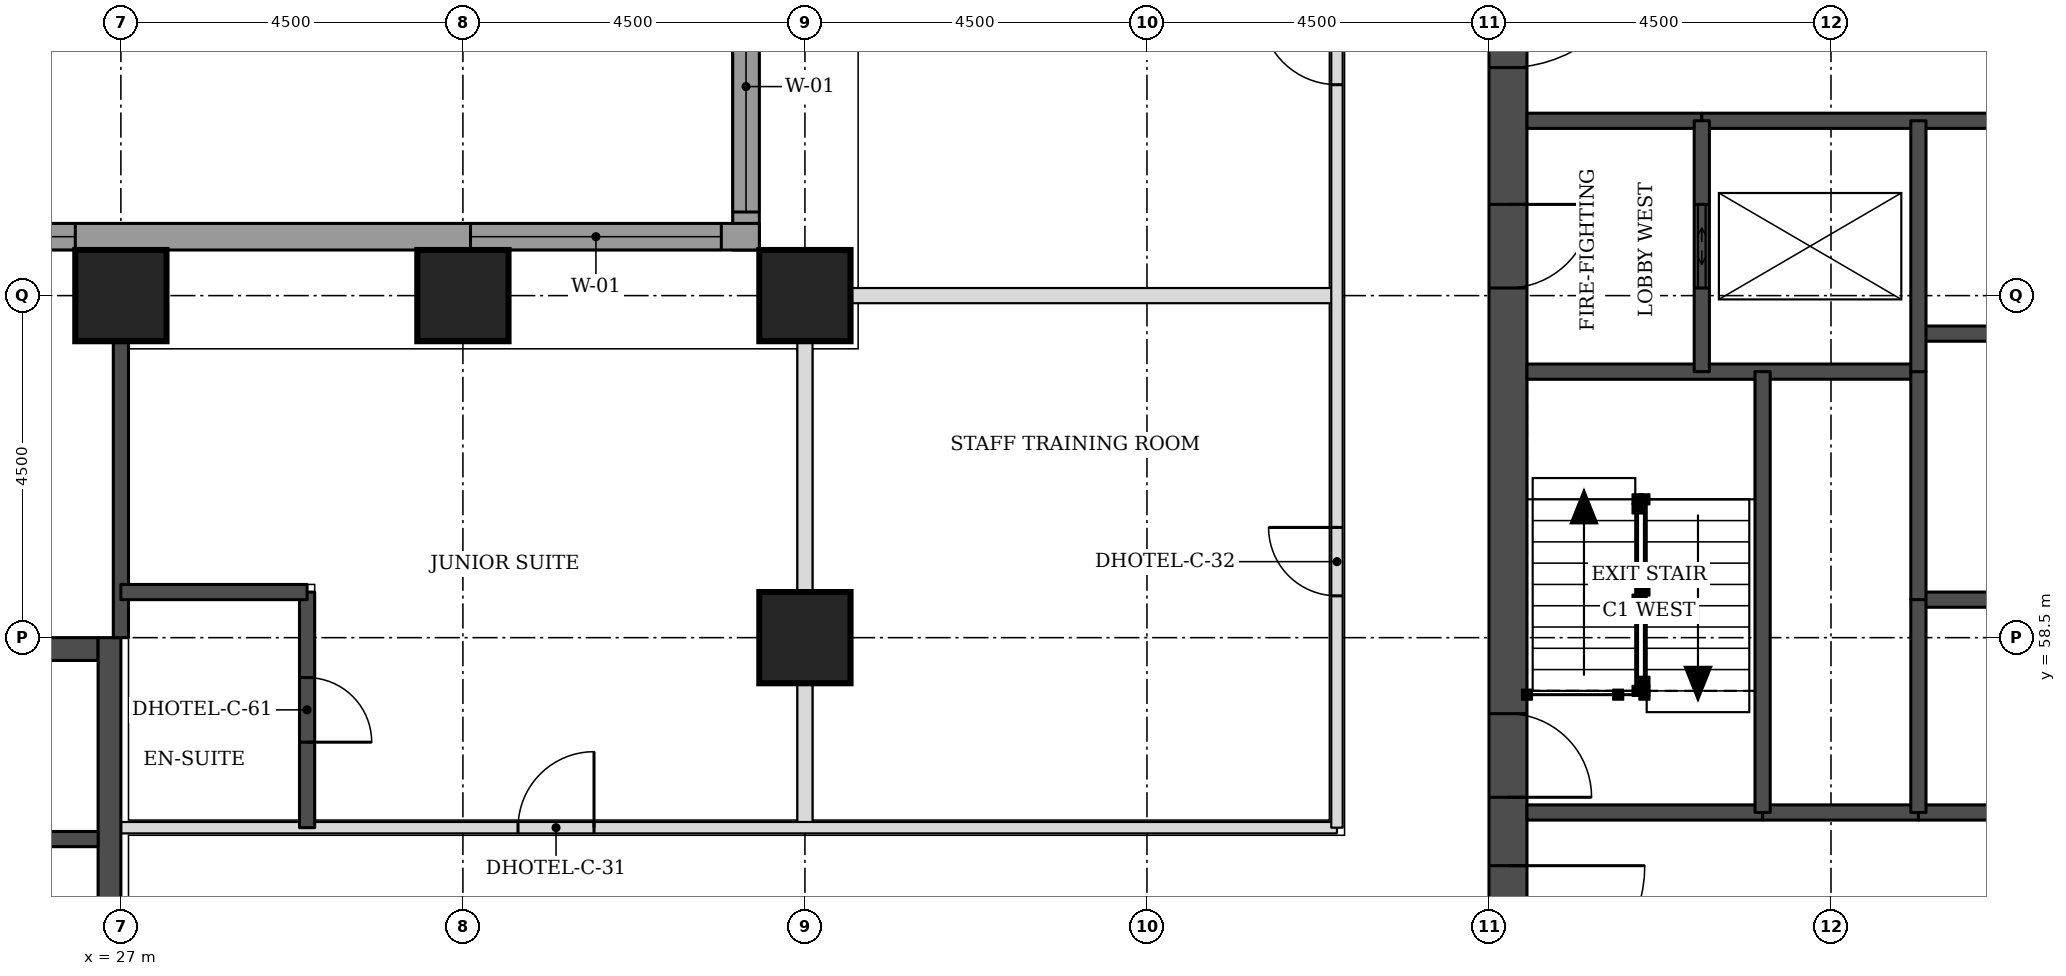
"""IFC4 building model, lengths in metres.
Left out: names, types, materials, properties, quantities, classifications, styles, units other than length and angle.
Written with IfcOpenShell. Run it as: python <this file> out.ifc"""

import sys

from ifc_helpers import new_model, si_unit, direction, frame, frame_2d, origin, origin_2d, place, context, subcontext, project, spatial, rectangle, extrude, element, fill, save


model = new_model("IFC4")
c1 = context("Model", 3, precision=1e-05, world=origin(), true_north=direction((0.0, 1.0)))
c2 = subcontext(c1, "Body", "Model", "MODEL_VIEW")
j1 = project(units=[si_unit("LENGTHUNIT", "METRE"), si_unit("PLANEANGLEUNIT", "RADIAN")], contexts=[c1])
p1 = place(None, origin())
s1 = spatial("IfcSite", under=j1, at=p1, CompositionType="ELEMENT")
p2 = place(p1, origin())
s2 = spatial("IfcBuilding", under=s1, at=p2, CompositionType="ELEMENT")
p3 = place(p2, frame((0.0, 0.0, 56.1)))
s3 = spatial("IfcBuildingStorey", under=s2, at=p3, CompositionType="ELEMENT", Elevation=56.1)
for number, where, z_axis, x_axis in (
    (1, (36.0, 58.5, 0.0), (0.0, 0.0, 1.0), (1.0, 0.0, 0.0)),
    (2, (27.0, 63.0, 0.0), (0.0, 0.0, 1.0), (1.0, 0.0, 0.0)),
    (3, (31.5, 63.0, 0.0), (0.0, 0.0, 1.0), (1.0, 0.0, 0.0)),
    (4, (36.0, 63.0, 0.0), (0.0, 0.0, 1.0), (1.0, 0.0, 0.0)),
):
    element("IfcColumn", number, at=place(p3, frame(where, z_axis=z_axis, x_axis=x_axis)), inside=s3, PredefinedType="COLUMN", context=c2, shape_type="SweptSolid", body=[
        extrude(rectangle(XDim=1.2, YDim=1.2, at=origin_2d()), origin(), (0.0, 0.0, 1.0), 3.3),
    ])
p4 = place(p3, frame((45.25, 49.5, 0.0), z_axis=(0.0, 0.0, 1.0), x_axis=(0.0, 1.0, 0.0)))
e5 = element("IfcWall", 5, at=p4, inside=s3, PredefinedType="SHEAR", context=c2, shape_type="SweptSolid", body=[
    extrude(rectangle(XDim=22.5, YDim=0.5, at=frame_2d((11.25, 0.0))), origin(), (0.0, 0.0, 1.0), 3.3),
])
p5 = place(p4, frame((4.2, 0.0, 0.0)))
e6 = element("IfcOpeningElement", 6, at=p5, cuts=e5, PredefinedType="OPENING", context=c2, shape_type="SweptSolid", body=[
    extrude(rectangle(XDim=1.8, YDim=2.1, at=frame_2d((0.9, 1.05))), frame((0.0, 0.26, 0.0), z_axis=(0.0, -1.0, 0.0), x_axis=(1.0, 0.0, 0.0)), (0.0, 0.0, 1.0), 0.52),
])
p6 = place(p4, frame((6.9, 0.0, 0.0)))
e7 = element("IfcOpeningElement", 7, at=p6, cuts=e5, PredefinedType="OPENING", context=c2, shape_type="SweptSolid", body=[
    extrude(rectangle(XDim=1.1, YDim=2.1, at=frame_2d((0.55, 1.05))), frame((0.0, 0.26, 0.0), z_axis=(0.0, -1.0, 0.0), x_axis=(1.0, 0.0, 0.0)), (0.0, 0.0, 1.0), 0.52),
])
p7 = place(p4, frame((13.6, 0.0, 0.0)))
e8 = element("IfcOpeningElement", 8, at=p7, cuts=e5, PredefinedType="OPENING", context=c2, shape_type="SweptSolid", body=[
    extrude(rectangle(XDim=1.1, YDim=2.1, at=frame_2d((0.55, 1.05))), frame((0.0, 0.26, 0.0), z_axis=(0.0, -1.0, 0.0), x_axis=(1.0, 0.0, 0.0)), (0.0, 0.0, 1.0), 0.52),
])
p8 = place(p4, frame((16.5, 0.0, 0.0)))
e9 = element("IfcOpeningElement", 9, at=p8, cuts=e5, PredefinedType="OPENING", context=c2, shape_type="SweptSolid", body=[
    extrude(rectangle(XDim=1.8, YDim=2.1, at=frame_2d((0.9, 1.05))), frame((0.0, 0.26, 0.0), z_axis=(0.0, -1.0, 0.0), x_axis=(1.0, 0.0, 0.0)), (0.0, 0.0, 1.0), 0.52),
])
p9 = place(p3, frame((18.3, 58.35, 0.0), z_axis=(0.0, 0.0, 1.0), x_axis=(1.0, 0.0, 0.0)))
e10 = element("IfcWall", 10, at=p9, inside=s3, PredefinedType="SHEAR", context=c2, shape_type="SweptSolid", body=[
    extrude(rectangle(XDim=8.4, YDim=0.3, at=frame_2d((4.2, 0.0))), origin(), (0.0, 0.0, 1.0), 3.3),
])
p10 = place(p9, frame((3.3, 0.0, 0.0)))
e11 = element("IfcOpeningElement", 11, at=p10, cuts=e10, PredefinedType="OPENING", context=c2, shape_type="SweptSolid", body=[
    extrude(rectangle(XDim=1.8, YDim=2.1, at=frame_2d((0.9, 1.05))), frame((0.0, 0.16, 0.0), z_axis=(0.0, -1.0, 0.0), x_axis=(1.0, 0.0, 0.0)), (0.0, 0.0, 1.0), 0.32),
])
p11 = place(p3, frame((26.85, 49.5, 0.0), z_axis=(0.0, 0.0, 1.0), x_axis=(0.0, 1.0, 0.0)))
e12 = element("IfcWall", 12, at=p11, inside=s3, PredefinedType="SHEAR", context=c2, shape_type="SweptSolid", body=[
    extrude(rectangle(XDim=9.0, YDim=0.3, at=frame_2d((4.5, 0.0))), origin(), (0.0, 0.0, 1.0), 3.3),
])
p12 = place(p3, frame((35.225, 76.894, 0.0), z_axis=(0.0, 0.0, 1.0), x_axis=(0.0, -1.0, 0.0)))
e13 = element("IfcWall", 13, at=p12, inside=s3, PredefinedType="STANDARD", context=c2, shape_type="SweptSolid", body=[
    extrude(rectangle(XDim=13.293, YDim=0.35, at=frame_2d((6.647, 0.0))), origin(), (0.0, 0.0, 1.0), 3.055),
])
p13 = place(p12, frame((9.493, 0.0, 0.8)))
e14 = element("IfcOpeningElement", 14, at=p13, cuts=e13, PredefinedType="OPENING", context=c2, shape_type="SweptSolid", body=[
    extrude(rectangle(XDim=3.3, YDim=1.5, at=frame_2d((1.65, 0.75))), frame((0.0, 0.185, 0.0), z_axis=(0.0, -1.0, 0.0), x_axis=(1.0, 0.0, 0.0)), (0.0, 0.0, 1.0), 0.37),
])
p14 = place(p3, frame((35.4, 63.775, 0.0), z_axis=(0.0, 0.0, 1.0), x_axis=(-1.0, 0.0, 0.0)))
e15 = element("IfcWall", 15, at=p14, inside=s3, PredefinedType="STANDARD", context=c2, shape_type="SweptSolid", body=[
    extrude(rectangle(XDim=17.793, YDim=0.35, at=frame_2d((8.897, 0.0))), origin(), (0.0, 0.0, 1.0), 3.055),
])
p15 = place(p14, frame((0.5, 0.0, 0.8)))
e16 = element("IfcOpeningElement", 16, at=p15, cuts=e15, PredefinedType="OPENING", context=c2, shape_type="SweptSolid", body=[
    extrude(rectangle(XDim=3.3, YDim=1.5, at=frame_2d((1.65, 0.75))), frame((0.0, 0.185, 0.0), z_axis=(0.0, -1.0, 0.0), x_axis=(1.0, 0.0, 0.0)), (0.0, 0.0, 1.0), 0.37),
])
p16 = place(p14, frame((9.0, 0.0, 0.8)))
e17 = element("IfcOpeningElement", 17, at=p16, cuts=e15, PredefinedType="OPENING", context=c2, shape_type="SweptSolid", body=[
    extrude(rectangle(XDim=3.3, YDim=1.5, at=frame_2d((1.65, 0.75))), frame((0.0, 0.185, 0.0), z_axis=(0.0, -1.0, 0.0), x_axis=(1.0, 0.0, 0.0)), (0.0, 0.0, 1.0), 0.37),
])
p17 = place(p3, frame((36.0, 56.0, 0.0), z_axis=(0.0, 0.0, 1.0), x_axis=(0.0, 1.0, 0.0)))
e18 = element("IfcWall", 18, at=p17, inside=s3, PredefinedType="PARTITIONING", context=c2, shape_type="SweptSolid", body=[
    extrude(rectangle(XDim=6.4, YDim=0.2, at=frame_2d((3.2, 0.0))), origin(), (0.0, 0.0, 1.0), 2.33),
])
p18 = place(p3, frame((36.6, 63.0, 0.0), z_axis=(0.0, 0.0, 1.0), x_axis=(1.0, 0.0, 0.0)))
e19 = element("IfcWall", 19, at=p18, inside=s3, PredefinedType="PARTITIONING", context=c2, shape_type="SweptSolid", body=[
    extrude(rectangle(XDim=6.4, YDim=0.2, at=frame_2d((3.2, 0.0))), origin(), (0.0, 0.0, 1.0), 3.08),
])
p19 = place(p3, frame((27.0, 56.0, 0.0), z_axis=(0.0, 0.0, 1.0), x_axis=(1.0, 0.0, 0.0)))
e20 = element("IfcWall", 20, at=p19, inside=s3, PredefinedType="PARTITIONING", context=c2, shape_type="SweptSolid", body=[
    extrude(rectangle(XDim=16.0, YDim=0.15, at=frame_2d((8.0, 0.0))), origin(), (0.0, 0.0, 1.0), 3.08),
])
p20 = place(p19, frame((5.225, 0.0, 0.0)))
e21 = element("IfcOpeningElement", 21, at=p20, cuts=e20, PredefinedType="OPENING", context=c2, shape_type="SweptSolid", body=[
    extrude(rectangle(XDim=1.0, YDim=2.1, at=frame_2d((0.5, 1.05))), frame((0.0, 0.085, 0.0), z_axis=(0.0, -1.0, 0.0), x_axis=(1.0, 0.0, 0.0)), (0.0, 0.0, 1.0), 0.17),
])
p21 = place(p3, frame((43.0, 56.0, 0.0), z_axis=(0.0, 0.0, 1.0), x_axis=(0.0, 1.0, 0.0)))
e22 = element("IfcWall", 22, at=p21, inside=s3, PredefinedType="PARTITIONING", context=c2, shape_type="SweptSolid", body=[
    extrude(rectangle(XDim=18.0, YDim=0.15, at=frame_2d((9.0, 0.0))), origin(), (0.0, 0.0, 1.0), 3.08),
])
p22 = place(p21, frame((9.775, 0.0, 0.0)))
e23 = element("IfcOpeningElement", 23, at=p22, cuts=e22, PredefinedType="OPENING", context=c2, shape_type="SweptSolid", body=[
    extrude(rectangle(XDim=1.0, YDim=2.1, at=frame_2d((0.5, 1.05))), frame((0.0, 0.085, 0.0), z_axis=(0.0, -1.0, 0.0), x_axis=(1.0, 0.0, 0.0)), (0.0, 0.0, 1.0), 0.17),
])
p23 = place(p21, frame((16.553, 0.0, 0.0)))
e24 = element("IfcOpeningElement", 24, at=p23, cuts=e22, PredefinedType="OPENING", context=c2, shape_type="SweptSolid", body=[
    extrude(rectangle(XDim=1.0, YDim=2.1, at=frame_2d((0.5, 1.05))), frame((0.0, 0.085, 0.0), z_axis=(0.0, -1.0, 0.0), x_axis=(1.0, 0.0, 0.0)), (0.0, 0.0, 1.0), 0.17),
])
p24 = place(p21, frame((3.05, 0.0, 0.0)))
e25 = element("IfcOpeningElement", 25, at=p24, cuts=e22, PredefinedType="OPENING", context=c2, shape_type="SweptSolid", body=[
    extrude(rectangle(XDim=0.9, YDim=2.1, at=frame_2d((0.45, 1.05))), frame((0.0, 0.085, 0.0), z_axis=(0.0, -1.0, 0.0), x_axis=(1.0, 0.0, 0.0)), (0.0, 0.0, 1.0), 0.17),
])
p25 = place(p3, frame((27.0, 58.5, 0.0), z_axis=(0.0, 0.0, 1.0), x_axis=(0.0, 1.0, 0.0)))
e26 = element("IfcWall", 26, at=p25, inside=s3, PredefinedType="SOLIDWALL", context=c2, shape_type="SweptSolid", body=[
    extrude(rectangle(XDim=3.9, YDim=0.2, at=frame_2d((1.95, 0.0))), origin(), (0.0, 0.0, 1.0), 3.08),
])
p26 = place(p3, frame((29.45, 56.0, 0.0), z_axis=(0.0, 0.0, 1.0), x_axis=(0.0, 1.0, 0.0)))
e27 = element("IfcWall", 27, at=p26, inside=s3, PredefinedType="SOLIDWALL", context=c2, shape_type="SweptSolid", body=[
    extrude(rectangle(XDim=3.1, YDim=0.2, at=frame_2d((1.55, 0.0))), origin(), (0.0, 0.0, 1.0), 3.08),
])
p27 = place(p26, frame((1.125, 0.0, 0.0)))
e28 = element("IfcOpeningElement", 28, at=p27, cuts=e27, PredefinedType="OPENING", context=c2, shape_type="SweptSolid", body=[
    extrude(rectangle(XDim=0.85, YDim=2.1, at=frame_2d((0.425, 1.05))), frame((0.0, 0.11, 0.0), z_axis=(0.0, -1.0, 0.0), x_axis=(1.0, 0.0, 0.0)), (0.0, 0.0, 1.0), 0.22),
])
p28 = place(p3, frame((27.0, 59.1, 0.0), z_axis=(0.0, 0.0, 1.0), x_axis=(1.0, 0.0, 0.0)))
e29 = element("IfcWall", 29, at=p28, inside=s3, PredefinedType="SOLIDWALL", context=c2, shape_type="SweptSolid", body=[
    extrude(rectangle(XDim=2.45, YDim=0.2, at=frame_2d((1.225, 0.0))), origin(), (0.0, 0.0, 1.0), 3.08),
])
p29 = place(p3, frame((48.6, 56.2, 0.0), z_axis=(0.0, 0.0, 1.0), x_axis=(1.0, 0.0, 0.0)))
e30 = element("IfcWall", 30, at=p29, inside=s3, PredefinedType="SOLIDWALL", context=c2, shape_type="SweptSolid", body=[
    extrude(rectangle(XDim=2.05, YDim=0.2, at=frame_2d((1.025, 0.0))), origin(), (0.0, 0.0, 1.0), 3.08),
])
p30 = place(p3, frame((45.5, 56.2, 0.0), z_axis=(0.0, 0.0, 1.0), x_axis=(1.0, 0.0, 0.0)))
e31 = element("IfcWall", 31, at=p30, inside=s3, PredefinedType="SOLIDWALL", context=c2, shape_type="SweptSolid", body=[
    extrude(rectangle(XDim=3.1, YDim=0.2, at=frame_2d((1.55, 0.0))), origin(), (0.0, 0.0, 1.0), 3.08),
])
p31 = place(p3, frame((50.65, 56.2, 0.0), z_axis=(0.0, 0.0, 1.0), x_axis=(1.0, 0.0, 0.0)))
e32 = element("IfcWall", 32, at=p31, inside=s3, PredefinedType="SOLIDWALL", context=c2, shape_type="SweptSolid", body=[
    extrude(rectangle(XDim=11.2, YDim=0.2, at=frame_2d((5.6, 0.0))), origin(), (0.0, 0.0, 1.0), 3.08),
])
p32 = place(p3, frame((50.65, 59.0, 0.0), z_axis=(0.0, 0.0, 1.0), x_axis=(1.0, 0.0, 0.0)))
e33 = element("IfcWall", 33, at=p32, inside=s3, PredefinedType="SOLIDWALL", context=c2, shape_type="SweptSolid", body=[
    extrude(rectangle(XDim=11.2, YDim=0.2, at=frame_2d((5.6, 0.0))), origin(), (0.0, 0.0, 1.0), 3.3),
])
p33 = place(p3, frame((45.5, 62.0, 0.0), z_axis=(0.0, 0.0, 1.0), x_axis=(1.0, 0.0, 0.0)))
e34 = element("IfcWall", 34, at=p33, inside=s3, PredefinedType="SOLIDWALL", context=c2, shape_type="SweptSolid", body=[
    extrude(rectangle(XDim=5.15, YDim=0.2, at=frame_2d((2.575, 0.0))), origin(), (0.0, 0.0, 1.0), 3.08),
])
p34 = place(p3, frame((50.65, 62.5, 0.0), z_axis=(0.0, 0.0, 1.0), x_axis=(1.0, 0.0, 0.0)))
e35 = element("IfcWall", 35, at=p34, inside=s3, PredefinedType="SOLIDWALL", context=c2, shape_type="SweptSolid", body=[
    extrude(rectangle(XDim=11.2, YDim=0.2, at=frame_2d((5.6, 0.0))), origin(), (0.0, 0.0, 1.0), 3.3),
])
p35 = place(p3, frame((45.5, 65.3, 0.0), z_axis=(0.0, 0.0, 1.0), x_axis=(1.0, 0.0, 0.0)))
e36 = element("IfcWall", 36, at=p35, inside=s3, PredefinedType="SOLIDWALL", context=c2, shape_type="SweptSolid", body=[
    extrude(rectangle(XDim=2.3, YDim=0.2, at=frame_2d((1.15, 0.0))), origin(), (0.0, 0.0, 1.0), 3.08),
])
p36 = place(p3, frame((47.8, 65.3, 0.0), z_axis=(0.0, 0.0, 1.0), x_axis=(1.0, 0.0, 0.0)))
e37 = element("IfcWall", 37, at=p36, inside=s3, PredefinedType="SOLIDWALL", context=c2, shape_type="SweptSolid", body=[
    extrude(rectangle(XDim=16.9, YDim=0.2, at=frame_2d((8.45, 0.0))), origin(), (0.0, 0.0, 1.0), 3.08),
])
p37 = place(p3, frame((47.8, 62.0, 0.0), z_axis=(0.0, 0.0, 1.0), x_axis=(0.0, 1.0, 0.0)))
e38 = element("IfcWall", 38, at=p37, inside=s3, PredefinedType="SOLIDWALL", context=c2, shape_type="SweptSolid", body=[
    extrude(rectangle(XDim=3.3, YDim=0.2, at=frame_2d((1.65, 0.0))), origin(), (0.0, 0.0, 1.0), 3.08),
])
p38 = place(p37, frame((1.1, 0.0, 0.0)))
e39 = element("IfcOpeningElement", 39, at=p38, cuts=e38, PredefinedType="OPENING", context=c2, shape_type="SweptSolid", body=[
    extrude(rectangle(XDim=1.1, YDim=2.1, at=frame_2d((0.55, 1.05))), frame((0.0, 0.11, 0.0), z_axis=(0.0, -1.0, 0.0), x_axis=(1.0, 0.0, 0.0)), (0.0, 0.0, 1.0), 0.22),
])
p39 = place(p3, frame((48.6, 56.2, 0.0), z_axis=(0.0, 0.0, 1.0), x_axis=(0.0, 1.0, 0.0)))
e40 = element("IfcWall", 40, at=p39, inside=s3, PredefinedType="SOLIDWALL", context=c2, shape_type="SweptSolid", body=[
    extrude(rectangle(XDim=5.8, YDim=0.2, at=frame_2d((2.9, 0.0))), origin(), (0.0, 0.0, 1.0), 3.08),
])
p40 = place(p3, frame((50.65, 59.0, 0.0), z_axis=(0.0, 0.0, 1.0), x_axis=(0.0, 1.0, 0.0)))
e41 = element("IfcWall", 41, at=p40, inside=s3, PredefinedType="SOLIDWALL", context=c2, shape_type="SweptSolid", body=[
    extrude(rectangle(XDim=3.0, YDim=0.2, at=frame_2d((1.5, 0.0))), origin(), (0.0, 0.0, 1.0), 3.3),
])
p41 = place(p3, frame((50.65, 56.2, 0.0), z_axis=(0.0, 0.0, 1.0), x_axis=(0.0, 1.0, 0.0)))
e42 = element("IfcWall", 42, at=p41, inside=s3, PredefinedType="SOLIDWALL", context=c2, shape_type="SweptSolid", body=[
    extrude(rectangle(XDim=2.8, YDim=0.2, at=frame_2d((1.4, 0.0))), origin(), (0.0, 0.0, 1.0), 3.08),
])
p42 = place(p3, frame((50.65, 62.0, 0.0), z_axis=(0.0, 0.0, 1.0), x_axis=(0.0, 1.0, 0.0)))
e43 = element("IfcWall", 43, at=p42, inside=s3, PredefinedType="SOLIDWALL", context=c2, shape_type="SweptSolid", body=[
    extrude(rectangle(XDim=3.3, YDim=0.2, at=frame_2d((1.65, 0.0))), origin(), (0.0, 0.0, 1.0), 3.08),
])
p43 = place(p3, frame((23.2, 55.85, 0.0), z_axis=(0.0, 0.0, 1.0), x_axis=(1.0, 0.0, 0.0)))
e44 = element("IfcWall", 44, at=p43, inside=s3, PredefinedType="SOLIDWALL", context=c2, shape_type="SweptSolid", body=[
    extrude(rectangle(XDim=3.5, YDim=0.2, at=frame_2d((1.75, 0.0))), origin(), (0.0, 0.0, 1.0), 3.08),
])
p44 = place(p43, frame((1.2, 0.0, 0.0)))
e45 = element("IfcOpeningElement", 45, at=p44, cuts=e44, PredefinedType="OPENING", context=c2, shape_type="SweptSolid", body=[
    extrude(rectangle(XDim=1.1, YDim=2.1, at=frame_2d((0.55, 1.05))), frame((0.0, 0.11, 0.0), z_axis=(0.0, -1.0, 0.0), x_axis=(1.0, 0.0, 0.0)), (0.0, 0.0, 1.0), 0.22),
])
p45 = place(p13, origin())
e46 = element("IfcWindow", 46, at=p45, inside=s3, PartitioningType="SINGLE_PANEL", PredefinedType="WINDOW", context=c2, shape_type="SweptSolid", body=[
    extrude(rectangle(XDim=3.3, YDim=1.5, at=frame_2d((1.65, 0.75))), frame((0.0, 0.085, 0.0), z_axis=(0.0, -1.0, 0.0), x_axis=(1.0, 0.0, 0.0)), (0.0, 0.0, 1.0), 0.06),
])
fill(e14, e46)
p46 = place(p15, origin())
e47 = element("IfcWindow", 47, at=p46, inside=s3, PartitioningType="SINGLE_PANEL", PredefinedType="WINDOW", context=c2, shape_type="SweptSolid", body=[
    extrude(rectangle(XDim=3.3, YDim=1.5, at=frame_2d((1.65, 0.75))), frame((0.0, 0.085, 0.0), z_axis=(0.0, -1.0, 0.0), x_axis=(1.0, 0.0, 0.0)), (0.0, 0.0, 1.0), 0.06),
])
fill(e16, e47)
p47 = place(p16, origin())
e48 = element("IfcWindow", 48, at=p47, inside=s3, PartitioningType="SINGLE_PANEL", PredefinedType="WINDOW", context=c2, shape_type="SweptSolid", body=[
    extrude(rectangle(XDim=3.3, YDim=1.5, at=frame_2d((1.65, 0.75))), frame((0.0, 0.085, 0.0), z_axis=(0.0, -1.0, 0.0), x_axis=(1.0, 0.0, 0.0)), (0.0, 0.0, 1.0), 0.06),
])
fill(e17, e48)
p48 = place(p20, origin())
e49 = element("IfcDoor", 49, at=p48, inside=s3, OperationType="SINGLE_SWING_RIGHT", PredefinedType="DOOR", context=c2, shape_type="SweptSolid", body=[
    extrude(rectangle(XDim=1.0, YDim=2.1, at=frame_2d((0.5, 1.05))), frame((0.0, 0.025, 0.0), z_axis=(0.0, -1.0, 0.0), x_axis=(1.0, 0.0, 0.0)), (0.0, 0.0, 1.0), 0.05),
])
fill(e21, e49)
p49 = place(p27, frame((0.85, 0.0, 0.0), z_axis=(0.0, 0.0, 1.0), x_axis=(-1.0, 0.0, 0.0)))
e50 = element("IfcDoor", 50, at=p49, inside=s3, OperationType="SINGLE_SWING_RIGHT", PredefinedType="DOOR", context=c2, shape_type="SweptSolid", body=[
    extrude(rectangle(XDim=0.85, YDim=2.1, at=frame_2d((0.425, 1.05))), frame((0.0, 0.025, 0.0), z_axis=(0.0, -1.0, 0.0), x_axis=(1.0, 0.0, 0.0)), (0.0, 0.0, 1.0), 0.05),
])
fill(e28, e50)
p50 = place(p22, origin())
e51 = element("IfcDoor", 51, at=p50, inside=s3, OperationType="SINGLE_SWING_RIGHT", PredefinedType="DOOR", context=c2, shape_type="SweptSolid", body=[
    extrude(rectangle(XDim=1.0, YDim=2.1, at=frame_2d((0.5, 1.05))), frame((0.0, 0.025, 0.0), z_axis=(0.0, -1.0, 0.0), x_axis=(1.0, 0.0, 0.0)), (0.0, 0.0, 1.0), 0.05),
])
fill(e23, e51)
p51 = place(p24, origin())
e52 = element("IfcDoor", 52, at=p51, inside=s3, OperationType="SINGLE_SWING_RIGHT", PredefinedType="DOOR", context=c2, shape_type="SweptSolid", body=[
    extrude(rectangle(XDim=0.9, YDim=2.1, at=frame_2d((0.45, 1.05))), frame((0.0, 0.025, 0.0), z_axis=(0.0, -1.0, 0.0), x_axis=(1.0, 0.0, 0.0)), (0.0, 0.0, 1.0), 0.05),
])
fill(e25, e52)
p52 = place(p38, origin())
e53 = element("IfcDoor", 53, at=p52, inside=s3, OperationType="DOUBLE_DOOR_SLIDING", PredefinedType="DOOR", context=c2, shape_type="SweptSolid", body=[
    extrude(rectangle(XDim=1.1, YDim=2.1, at=frame_2d((0.55, 1.05))), frame((0.0, 0.025, 0.0), z_axis=(0.0, -1.0, 0.0), x_axis=(1.0, 0.0, 0.0)), (0.0, 0.0, 1.0), 0.05),
])
fill(e39, e53)
p53 = place(p5, frame((1.8, 0.0, 0.0), z_axis=(0.0, 0.0, 1.0), x_axis=(-1.0, 0.0, 0.0)))
e54 = element("IfcDoor", 54, at=p53, inside=s3, OperationType="SINGLE_SWING_LEFT", PredefinedType="DOOR", context=c2, shape_type="SweptSolid", body=[
    extrude(rectangle(XDim=1.8, YDim=2.1, at=frame_2d((0.9, 1.05))), frame((0.0, 0.025, 0.0), z_axis=(0.0, -1.0, 0.0), x_axis=(1.0, 0.0, 0.0)), (0.0, 0.0, 1.0), 0.05),
])
fill(e6, e54)
p54 = place(p6, frame((1.1, 0.0, 0.0), z_axis=(0.0, 0.0, 1.0), x_axis=(-1.0, 0.0, 0.0)))
e55 = element("IfcDoor", 55, at=p54, inside=s3, OperationType="SINGLE_SWING_RIGHT", PredefinedType="DOOR", context=c2, shape_type="SweptSolid", body=[
    extrude(rectangle(XDim=1.1, YDim=2.1, at=frame_2d((0.55, 1.05))), frame((0.0, 0.025, 0.0), z_axis=(0.0, -1.0, 0.0), x_axis=(1.0, 0.0, 0.0)), (0.0, 0.0, 1.0), 0.05),
])
fill(e7, e55)
p55 = place(p7, frame((1.1, 0.0, 0.0), z_axis=(0.0, 0.0, 1.0), x_axis=(-1.0, 0.0, 0.0)))
e56 = element("IfcDoor", 56, at=p55, inside=s3, OperationType="SINGLE_SWING_LEFT", PredefinedType="DOOR", context=c2, shape_type="SweptSolid", body=[
    extrude(rectangle(XDim=1.1, YDim=2.1, at=frame_2d((0.55, 1.05))), frame((0.0, 0.025, 0.0), z_axis=(0.0, -1.0, 0.0), x_axis=(1.0, 0.0, 0.0)), (0.0, 0.0, 1.0), 0.05),
])
fill(e8, e56)
p56 = place(p8, frame((1.8, 0.0, 0.0), z_axis=(0.0, 0.0, 1.0), x_axis=(-1.0, 0.0, 0.0)))
e57 = element("IfcDoor", 57, at=p56, inside=s3, OperationType="SINGLE_SWING_LEFT", PredefinedType="DOOR", context=c2, shape_type="SweptSolid", body=[
    extrude(rectangle(XDim=1.8, YDim=2.1, at=frame_2d((0.9, 1.05))), frame((0.0, 0.025, 0.0), z_axis=(0.0, -1.0, 0.0), x_axis=(1.0, 0.0, 0.0)), (0.0, 0.0, 1.0), 0.05),
])
fill(e9, e57)
save(model, sys.argv[1])
